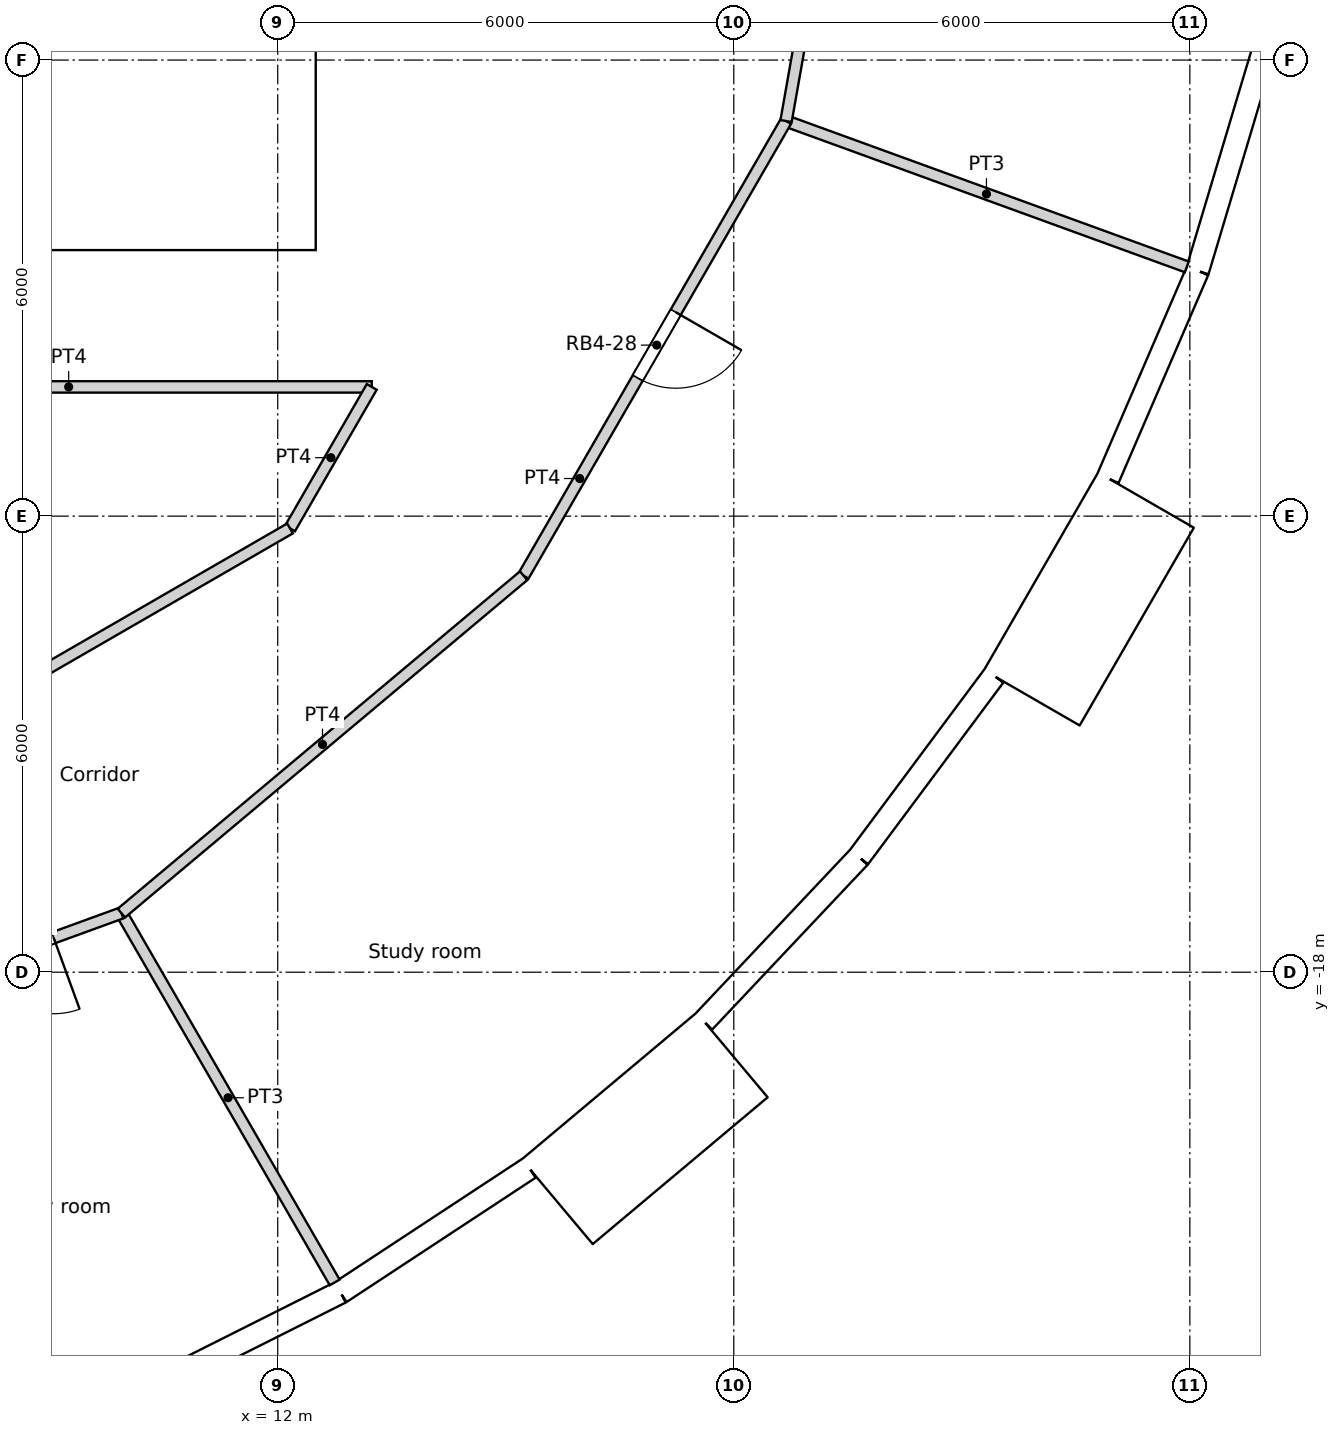
"""IFC4 building model, lengths in metres.
Left out: names, types, materials, properties, quantities, classifications, styles, units other than length and angle.
Written with IfcOpenShell. Run it as: python <this file> out.ifc"""

import sys

from ifc_helpers import new_model, si_unit, direction, frame, frame_2d, origin, origin_2d, place, context, subcontext, project, spatial, rectangle, circle, extrude, element, fill, save


model = new_model("IFC4")
c1 = context("Model", 3, precision=1e-05, world=origin(), true_north=direction((0.0, 1.0)))
c2 = subcontext(c1, "Body", "Model", "MODEL_VIEW")
j1 = project(units=[si_unit("LENGTHUNIT", "METRE"), si_unit("PLANEANGLEUNIT", "RADIAN")], contexts=[c1])
p1 = place(None, origin())
s1 = spatial("IfcSite", under=j1, at=p1, CompositionType="ELEMENT")
p2 = place(p1, origin())
s2 = spatial("IfcBuilding", under=s1, at=p2, CompositionType="ELEMENT")
p3 = place(p2, frame((0.0, 0.0, 158.4)))
s3 = spatial("IfcBuildingStorey", under=s2, at=p3, CompositionType="ELEMENT", Elevation=158.4)
for number, where, z_axis, x_axis in (
    (1, (9.723, -22.54, 0.0), (0.0, 0.0, 1.0), (1.0, 0.0, 0.0)),
    (2, (14.659, -19.69, 0.0), (0.0, 0.0, 1.0), (1.0, 0.0, 0.0)),
    (3, (18.805, -15.779, 0.0), (0.0, 0.0, 1.0), (1.0, 0.0, 0.0)),
    (4, (21.937, -11.017, 0.0), (0.0, 0.0, 1.0), (1.0, 0.0, 0.0)),
    (5, (23.886, -5.661, 0.0), (0.0, 0.0, 1.0), (1.0, 0.0, 0.0)),
):
    element("IfcColumn", number, at=place(p3, frame(where, z_axis=z_axis, x_axis=x_axis)), inside=s3, PredefinedType="COLUMN", context=c2, shape_type="SweptSolid", body=[
        extrude(circle(Radius=0.6, at=origin_2d()), origin(), (0.0, 0.0, 1.0), 3.6),
    ])
for number, where, z_axis, x_axis in (
    (6, (11.735, -14.716, 0.0), (0.0, 0.0, 1.0), (1.0, 0.0, 0.0)),
    (7, (15.552, -10.603, 0.0), (0.0, 0.0, 1.0), (1.0, 0.0, 0.0)),
    (8, (17.986, -5.548, 0.0), (0.0, 0.0, 1.0), (1.0, 0.0, 0.0)),
):
    element("IfcColumn", number, at=place(p3, frame(where, z_axis=z_axis, x_axis=x_axis)), inside=s3, PredefinedType="COLUMN", context=c2, shape_type="SweptSolid", body=[
        extrude(circle(Radius=0.65, at=origin_2d()), origin(), (0.0, 0.0, 1.0), 3.6),
    ])
p4 = place(p3, frame((10.167, -23.546, 0.0), z_axis=(0.0, 0.0, 1.0), x_axis=(0.893637442555, 0.448789618045, 0.0)))
e9 = element("IfcWall", 9, at=p4, inside=s3, PredefinedType="SOLIDWALL", context=c2, shape_type="SweptSolid", body=[
    extrude(rectangle(XDim=2.973, YDim=0.3, at=frame_2d((1.486, 0.0))), origin(), (0.0, 0.0, 1.0), 3.3),
])
p5 = place(p4, frame((1.486, 0.0, 1.55)))
e10 = element("IfcOpeningElement", 10, at=p5, cuts=e9, PredefinedType="OPENING", context=c2, shape_type="SweptSolid", body=[
    extrude(circle(Radius=0.9, at=origin_2d()), frame((0.0, 0.16, 0.0), z_axis=(0.0, -1.0, 0.0), x_axis=(1.0, 0.0, 0.0)), (0.0, 0.0, 1.0), 0.32),
])
p6 = place(p3, frame((12.824, -22.211, 0.0), z_axis=(0.0, 0.0, 1.0), x_axis=(0.835470659512, 0.549535055382, 0.0)))
e11 = element("IfcWall", 11, at=p6, inside=s3, PredefinedType="SOLIDWALL", context=c2, shape_type="SweptSolid", body=[
    extrude(rectangle(XDim=2.973, YDim=0.3, at=frame_2d((1.487, 0.0))), origin(), (0.0, 0.0, 1.0), 3.3),
])
p7 = place(p6, frame((1.486, 0.0, 1.55)))
e12 = element("IfcOpeningElement", 12, at=p7, cuts=e11, PredefinedType="OPENING", context=c2, shape_type="SweptSolid", body=[
    extrude(circle(Radius=0.9, at=origin_2d()), frame((0.0, 0.16, 0.0), z_axis=(0.0, -1.0, 0.0), x_axis=(1.0, 0.0, 0.0)), (0.0, 0.0, 1.0), 0.32),
])
p8 = place(p3, frame((15.678, -21.019, -0.3), z_axis=(0.0, 0.0, 1.0), x_axis=(0.766022196139, 0.642814121673, 0.0)))
e13 = element("IfcWall", 13, at=p8, inside=s3, PredefinedType="ELEMENTEDWALL", context=c2, shape_type="SweptSolid", body=[
    extrude(rectangle(XDim=3.0, YDim=1.45, at=frame_2d((1.5, 0.0))), origin(), (0.0, 0.0, 1.0), 3.6),
])
p9 = place(p8, frame((1.5, 0.0, 1.85)))
e14 = element("IfcOpeningElement", 14, at=p9, cuts=e13, PredefinedType="OPENING", context=c2, shape_type="SweptSolid", body=[
    extrude(circle(Radius=0.9, at=origin_2d()), frame((0.0, 0.735, 0.0), z_axis=(0.0, -1.0, 0.0), x_axis=(1.0, 0.0, 0.0)), (0.0, 0.0, 1.0), 1.47),
])
p10 = place(p3, frame((17.607, -18.648, 0.0), z_axis=(0.0, 0.0, 1.0), x_axis=(0.686235184166, 0.727379730273, 0.0)))
e15 = element("IfcWall", 15, at=p10, inside=s3, PredefinedType="SOLIDWALL", context=c2, shape_type="SweptSolid", body=[
    extrude(rectangle(XDim=2.973, YDim=0.3, at=frame_2d((1.486, 0.0))), origin(), (0.0, 0.0, 1.0), 3.3),
])
p11 = place(p10, frame((1.486, 0.0, 1.55)))
e16 = element("IfcOpeningElement", 16, at=p11, cuts=e15, PredefinedType="OPENING", context=c2, shape_type="SweptSolid", body=[
    extrude(circle(Radius=0.9, at=origin_2d()), frame((0.0, 0.16, 0.0), z_axis=(0.0, -1.0, 0.0), x_axis=(1.0, 0.0, 0.0)), (0.0, 0.0, 1.0), 0.32),
])
p12 = place(p3, frame((19.647, -16.486, 0.0), z_axis=(0.0, 0.0, 1.0), x_axis=(0.597197580538, 0.80209416517, 0.0)))
e17 = element("IfcWall", 17, at=p12, inside=s3, PredefinedType="SOLIDWALL", context=c2, shape_type="SweptSolid", body=[
    extrude(rectangle(XDim=2.973, YDim=0.3, at=frame_2d((1.486, 0.0))), origin(), (0.0, 0.0, 1.0), 3.3),
])
p13 = place(p12, frame((1.486, 0.0, 1.55)))
e18 = element("IfcOpeningElement", 18, at=p13, cuts=e17, PredefinedType="OPENING", context=c2, shape_type="SweptSolid", body=[
    extrude(circle(Radius=0.9, at=origin_2d()), frame((0.0, 0.16, 0.0), z_axis=(0.0, -1.0, 0.0), x_axis=(1.0, 0.0, 0.0)), (0.0, 0.0, 1.0), 0.32),
])
p14 = place(p3, frame((21.922, -14.389, -0.3), z_axis=(0.0, 0.0, 1.0), x_axis=(0.499990139034, 0.866031096941, 0.0)))
e19 = element("IfcWall", 19, at=p14, inside=s3, PredefinedType="ELEMENTEDWALL", context=c2, shape_type="SweptSolid", body=[
    extrude(rectangle(XDim=3.0, YDim=1.45, at=frame_2d((1.5, 0.0))), origin(), (0.0, 0.0, 1.0), 3.6),
])
p15 = place(p14, frame((1.5, 0.0, 1.85)))
e20 = element("IfcOpeningElement", 20, at=p15, cuts=e19, PredefinedType="OPENING", context=c2, shape_type="SweptSolid", body=[
    extrude(circle(Radius=0.9, at=origin_2d()), frame((0.0, 0.735, 0.0), z_axis=(0.0, -1.0, 0.0), x_axis=(1.0, 0.0, 0.0)), (0.0, 0.0, 1.0), 1.47),
])
p16 = place(p3, frame((22.923, -11.502, 0.0), z_axis=(0.0, 0.0, 1.0), x_axis=(0.396148129016, 0.918186614952, 0.0)))
e21 = element("IfcWall", 21, at=p16, inside=s3, PredefinedType="SOLIDWALL", context=c2, shape_type="SweptSolid", body=[
    extrude(rectangle(XDim=2.973, YDim=0.3, at=frame_2d((1.486, 0.0))), origin(), (0.0, 0.0, 1.0), 3.3),
])
p17 = place(p16, frame((1.486, 0.0, 1.55)))
e22 = element("IfcOpeningElement", 22, at=p17, cuts=e21, PredefinedType="OPENING", context=c2, shape_type="SweptSolid", body=[
    extrude(circle(Radius=0.9, at=origin_2d()), frame((0.0, 0.16, 0.0), z_axis=(0.0, -1.0, 0.0), x_axis=(1.0, 0.0, 0.0)), (0.0, 0.0, 1.0), 0.32),
])
p18 = place(p3, frame((24.101, -8.772, 0.0), z_axis=(0.0, 0.0, 1.0), x_axis=(0.286782750849, 0.957995643944, 0.0)))
e23 = element("IfcWall", 23, at=p18, inside=s3, PredefinedType="SOLIDWALL", context=c2, shape_type="SweptSolid", body=[
    extrude(rectangle(XDim=2.973, YDim=0.3, at=frame_2d((1.486, 0.0))), origin(), (0.0, 0.0, 1.0), 3.3),
])
p19 = place(p18, frame((1.486, 0.0, 1.55)))
e24 = element("IfcOpeningElement", 24, at=p19, cuts=e23, PredefinedType="OPENING", context=c2, shape_type="SweptSolid", body=[
    extrude(circle(Radius=0.9, at=origin_2d()), frame((0.0, 0.16, 0.0), z_axis=(0.0, -1.0, 0.0), x_axis=(1.0, 0.0, 0.0)), (0.0, 0.0, 1.0), 0.32),
])
p20 = place(p3, frame((25.521, -6.023, -0.3), z_axis=(0.0, 0.0, 1.0), x_axis=(0.173669267716, 0.984804034035, 0.0)))
e25 = element("IfcWall", 25, at=p20, inside=s3, PredefinedType="ELEMENTEDWALL", context=c2, shape_type="SweptSolid", body=[
    extrude(rectangle(XDim=3.0, YDim=1.45, at=frame_2d((1.5, 0.0))), origin(), (0.0, 0.0, 1.0), 3.6),
])
p21 = place(p20, frame((1.5, 0.0, 1.85)))
e26 = element("IfcOpeningElement", 26, at=p21, cuts=e25, PredefinedType="OPENING", context=c2, shape_type="SweptSolid", body=[
    extrude(circle(Radius=0.9, at=origin_2d()), frame((0.0, 0.735, 0.0), z_axis=(0.0, -1.0, 0.0), x_axis=(1.0, 0.0, 0.0)), (0.0, 0.0, 1.0), 1.47),
])
p22 = place(p3, frame((-12.5, -8.05, 0.0), z_axis=(0.0, 0.0, 1.0), x_axis=(1.0, 0.0, 0.0)))
e27 = element("IfcWall", 27, at=p22, inside=s3, PredefinedType="SOLIDWALL", context=c2, shape_type="SweptSolid", body=[
    extrude(rectangle(XDim=25.0, YDim=0.9, at=frame_2d((12.5, 0.0))), origin(), (0.0, 0.0, 1.0), 3.6),
])
p23 = place(p22, frame((13.4, 0.0, 0.0)))
e28 = element("IfcOpeningElement", 28, at=p23, cuts=e27, PredefinedType="OPENING", context=c2, shape_type="SweptSolid", body=[
    extrude(rectangle(XDim=1.0, YDim=2.1, at=frame_2d((0.5, 1.05))), frame((0.0, 0.45, 0.0), z_axis=(0.0, -1.0, 0.0), x_axis=(1.0, 0.0, 0.0)), (0.0, 0.0, 1.0), 0.9),
])
p24 = place(p22, frame((8.3, 0.0, 0.0)))
e29 = element("IfcOpeningElement", 29, at=p24, cuts=e27, PredefinedType="OPENING", context=c2, shape_type="SweptSolid", body=[
    extrude(rectangle(XDim=1.8, YDim=2.1, at=frame_2d((0.9, 1.05))), frame((0.0, 0.45, 0.0), z_axis=(0.0, -1.0, 0.0), x_axis=(1.0, 0.0, 0.0)), (0.0, 0.0, 1.0), 0.9),
])
p25 = place(p22, frame((14.9, 0.0, 0.0)))
e30 = element("IfcOpeningElement", 30, at=p25, cuts=e27, PredefinedType="OPENING", context=c2, shape_type="SweptSolid", body=[
    extrude(rectangle(XDim=1.8, YDim=2.1, at=frame_2d((0.9, 1.05))), frame((0.0, 0.45, 0.0), z_axis=(0.0, -1.0, 0.0), x_axis=(1.0, 0.0, 0.0)), (0.0, 0.0, 1.0), 0.9),
])
p26 = place(p3, frame((12.05, -7.6, 0.0), z_axis=(0.0, 0.0, 1.0), x_axis=(0.0, 1.0, 0.0)))
e31 = element("IfcWall", 31, at=p26, inside=s3, PredefinedType="SOLIDWALL", context=c2, shape_type="SweptSolid", body=[
    extrude(rectangle(XDim=15.2, YDim=0.9, at=frame_2d((7.6, 0.0))), origin(), (0.0, 0.0, 1.0), 3.6),
])
p27 = place(p26, frame((5.1, 0.0, 0.0)))
e32 = element("IfcOpeningElement", 32, at=p27, cuts=e31, PredefinedType="OPENING", context=c2, shape_type="SweptSolid", body=[
    extrude(rectangle(XDim=1.0, YDim=2.1, at=frame_2d((0.5, 1.05))), frame((0.0, 0.45, 0.0), z_axis=(0.0, -1.0, 0.0), x_axis=(1.0, 0.0, 0.0)), (0.0, 0.0, 1.0), 0.9),
])
p28 = place(p3, frame((9.05, -7.0, 0.0), z_axis=(0.0, 0.0, 1.0), x_axis=(0.0, 1.0, 0.0)))
e33 = element("IfcWall", 33, at=p28, inside=s3, PredefinedType="SOLIDWALL", context=c2, shape_type="SweptSolid", body=[
    extrude(rectangle(XDim=14.0, YDim=0.3, at=frame_2d((7.0, 0.0))), origin(), (0.0, 0.0, 1.0), 3.3),
])
p29 = place(p28, frame((7.0, 0.0, 0.0)))
e34 = element("IfcOpeningElement", 34, at=p29, cuts=e33, PredefinedType="OPENING", context=c2, shape_type="SweptSolid", body=[
    extrude(rectangle(XDim=1.8, YDim=2.1, at=frame_2d((0.9, 1.05))), frame((0.0, 0.15, 0.0), z_axis=(0.0, -1.0, 0.0), x_axis=(1.0, 0.0, 0.0)), (0.0, 0.0, 1.0), 0.3),
])
p30 = place(p3, frame((4.2, -7.15, 0.0), z_axis=(0.0, 0.0, 1.0), x_axis=(1.0, 0.0, 0.0)))
e35 = element("IfcWall", 35, at=p30, inside=s3, PredefinedType="SOLIDWALL", context=c2, shape_type="SweptSolid", body=[
    extrude(rectangle(XDim=4.85, YDim=0.9, at=frame_2d((2.425, 0.0))), origin(), (0.0, 0.0, 1.0), 3.3),
])
p31 = place(p3, frame((-3.025, -10.3, 0.0), z_axis=(0.0, 0.0, 1.0), x_axis=(1.0, 0.0, 0.0)))
e36 = element("IfcWall", 36, at=p31, inside=s3, PredefinedType="PARTITIONING", context=c2, shape_type="SweptSolid", body=[
    extrude(rectangle(XDim=16.262, YDim=0.15, at=frame_2d((8.131, 0.0))), origin(), (0.0, 0.0, 1.0), 3.3),
])
p32 = place(p31, frame((7.287, 0.0, 0.0)))
e37 = element("IfcOpeningElement", 37, at=p32, cuts=e36, PredefinedType="OPENING", context=c2, shape_type="SweptSolid", body=[
    extrude(rectangle(XDim=0.95, YDim=2.1, at=frame_2d((0.475, 1.05))), frame((0.0, 0.075, 0.0), z_axis=(0.0, -1.0, 0.0), x_axis=(1.0, 0.0, 0.0)), (0.0, 0.0, 1.0), 0.15),
])
p33 = place(p3, frame((12.162, -12.162, 0.0), z_axis=(0.0, 0.0, 1.0), x_axis=(0.499961633463, 0.866047553582, 0.0)))
e38 = element("IfcWall", 38, at=p33, inside=s3, PredefinedType="PARTITIONING", context=c2, shape_type="SweptSolid", body=[
    extrude(rectangle(XDim=2.15, YDim=0.15, at=frame_2d((1.075, 0.0))), origin(), (0.0, 0.0, 1.0), 3.3),
])
p34 = place(p3, frame((15.235, -12.784, 0.0), z_axis=(0.0, 0.0, 1.0), x_axis=(0.499914202267, 0.866074933462, 0.0)))
e39 = element("IfcWall", 39, at=p34, inside=s3, PredefinedType="PARTITIONING", context=c2, shape_type="SweptSolid", body=[
    extrude(rectangle(XDim=6.907, YDim=0.15, at=frame_2d((3.454, 0.0))), origin(), (0.0, 0.0, 1.0), 3.3),
])
p35 = place(p34, frame((3.003, 0.0, 0.0)))
e40 = element("IfcOpeningElement", 40, at=p35, cuts=e39, PredefinedType="OPENING", context=c2, shape_type="SweptSolid", body=[
    extrude(rectangle(XDim=1.0, YDim=2.04, at=frame_2d((0.5, 1.02))), frame((0.0, 0.075, 0.0), z_axis=(0.0, -1.0, 0.0), x_axis=(1.0, 0.0, 0.0)), (0.0, 0.0, 1.0), 0.15),
])
p36 = place(p3, frame((9.943, -17.222, 0.0), z_axis=(0.0, 0.0, 1.0), x_axis=(0.766192104565, 0.642611592567, 0.0)))
e41 = element("IfcWall", 41, at=p36, inside=s3, PredefinedType="PARTITIONING", context=c2, shape_type="SweptSolid", body=[
    extrude(rectangle(XDim=6.906, YDim=0.15, at=frame_2d((3.453, 0.0))), origin(), (0.0, 0.0, 1.0), 3.3),
])
p37 = place(p3, frame((18.688, -6.802, 0.0), z_axis=(0.0, 0.0, 1.0), x_axis=(0.173728873845, 0.98479352069, 0.0)))
e42 = element("IfcWall", 42, at=p37, inside=s3, PredefinedType="PARTITIONING", context=c2, shape_type="SweptSolid", body=[
    extrude(rectangle(XDim=6.907, YDim=0.15, at=frame_2d((3.454, 0.0))), origin(), (0.0, 0.0, 1.0), 3.3),
])
p38 = place(p37, frame((2.953, 0.0, 0.0)))
e43 = element("IfcOpeningElement", 43, at=p38, cuts=e42, PredefinedType="OPENING", context=c2, shape_type="SweptSolid", body=[
    extrude(rectangle(XDim=1.0, YDim=2.04, at=frame_2d((0.5, 1.02))), frame((0.0, 0.075, 0.0), z_axis=(0.0, -1.0, 0.0), x_axis=(1.0, 0.0, 0.0)), (0.0, 0.0, 1.0), 0.15),
])
p39 = place(p3, frame((4.452, -16.614, 0.0), z_axis=(0.0, 0.0, 1.0), x_axis=(0.866005203721, 0.500034985904, 0.0)))
e44 = element("IfcWall", 44, at=p39, inside=s3, PredefinedType="PARTITIONING", context=c2, shape_type="SweptSolid", body=[
    extrude(rectangle(XDim=8.903, YDim=0.15, at=frame_2d((4.452, 0.0))), origin(), (0.0, 0.0, 1.0), 3.3),
])
p40 = place(p3, frame((3.453, -19.586, 0.0), z_axis=(0.0, 0.0, 1.0), x_axis=(0.939607544688, 0.342253797591, 0.0)))
e45 = element("IfcWall", 45, at=p40, inside=s3, PredefinedType="PARTITIONING", context=c2, shape_type="SweptSolid", body=[
    extrude(rectangle(XDim=6.908, YDim=0.15, at=frame_2d((3.454, 0.0))), origin(), (0.0, 0.0, 1.0), 3.3),
])
p41 = place(p40, frame((4.959, 0.0, 0.0)))
e46 = element("IfcOpeningElement", 46, at=p41, cuts=e45, PredefinedType="OPENING", context=c2, shape_type="SweptSolid", body=[
    extrude(rectangle(XDim=1.0, YDim=2.04, at=frame_2d((0.5, 1.02))), frame((0.0, 0.075, 0.0), z_axis=(0.0, -1.0, 0.0), x_axis=(1.0, 0.0, 0.0)), (0.0, 0.0, 1.0), 0.15),
])
p42 = place(p3, frame((9.944, -17.223, 0.0), z_axis=(0.0, 0.0, 1.0), x_axis=(0.500010020406, -0.866019618423, 0.0)))
e47 = element("IfcWall", 47, at=p42, inside=s3, PredefinedType="PARTITIONING", context=c2, shape_type="SweptSolid", body=[
    extrude(rectangle(XDim=5.61, YDim=0.15, at=frame_2d((2.805, 0.0))), origin(), (0.0, 0.0, 1.0), 3.3),
])
p43 = place(p3, frame((18.688, -6.802, 0.0), z_axis=(0.0, 0.0, 1.0), x_axis=(0.939686652043, -0.342036541866, 0.0)))
e48 = element("IfcWall", 48, at=p43, inside=s3, PredefinedType="PARTITIONING", context=c2, shape_type="SweptSolid", body=[
    extrude(rectangle(XDim=5.61, YDim=0.15, at=frame_2d((2.805, 0.0))), origin(), (0.0, 0.0, 1.0), 3.3),
])
p44 = place(p5, origin())
e49 = element("IfcWindow", 49, at=p44, inside=s3, PartitioningType="SINGLE_PANEL", PredefinedType="WINDOW", context=c2, shape_type="SweptSolid", body=[
    extrude(circle(Radius=0.9, at=origin_2d()), frame((0.0, 0.12, 0.0), z_axis=(0.0, -1.0, 0.0), x_axis=(1.0, 0.0, 0.0)), (0.0, 0.0, 1.0), 0.1),
])
fill(e10, e49)
p45 = place(p7, origin())
e50 = element("IfcWindow", 50, at=p45, inside=s3, PartitioningType="SINGLE_PANEL", PredefinedType="WINDOW", context=c2, shape_type="SweptSolid", body=[
    extrude(circle(Radius=0.9, at=origin_2d()), frame((0.0, 0.12, 0.0), z_axis=(0.0, -1.0, 0.0), x_axis=(1.0, 0.0, 0.0)), (0.0, 0.0, 1.0), 0.1),
])
fill(e12, e50)
p46 = place(p9, origin())
e51 = element("IfcWindow", 51, at=p46, inside=s3, PartitioningType="SINGLE_PANEL", PredefinedType="WINDOW", context=c2, shape_type="SweptSolid", body=[
    extrude(circle(Radius=0.9, at=origin_2d()), frame((0.0, 0.695, 0.0), z_axis=(0.0, -1.0, 0.0), x_axis=(1.0, 0.0, 0.0)), (0.0, 0.0, 1.0), 0.1),
])
fill(e14, e51)
p47 = place(p11, origin())
e52 = element("IfcWindow", 52, at=p47, inside=s3, PartitioningType="SINGLE_PANEL", PredefinedType="WINDOW", context=c2, shape_type="SweptSolid", body=[
    extrude(circle(Radius=0.9, at=origin_2d()), frame((0.0, 0.12, 0.0), z_axis=(0.0, -1.0, 0.0), x_axis=(1.0, 0.0, 0.0)), (0.0, 0.0, 1.0), 0.1),
])
fill(e16, e52)
p48 = place(p13, origin())
e53 = element("IfcWindow", 53, at=p48, inside=s3, PartitioningType="SINGLE_PANEL", PredefinedType="WINDOW", context=c2, shape_type="SweptSolid", body=[
    extrude(circle(Radius=0.9, at=origin_2d()), frame((0.0, 0.12, 0.0), z_axis=(0.0, -1.0, 0.0), x_axis=(1.0, 0.0, 0.0)), (0.0, 0.0, 1.0), 0.1),
])
fill(e18, e53)
p49 = place(p15, origin())
e54 = element("IfcWindow", 54, at=p49, inside=s3, PartitioningType="SINGLE_PANEL", PredefinedType="WINDOW", context=c2, shape_type="SweptSolid", body=[
    extrude(circle(Radius=0.9, at=origin_2d()), frame((0.0, 0.695, 0.0), z_axis=(0.0, -1.0, 0.0), x_axis=(1.0, 0.0, 0.0)), (0.0, 0.0, 1.0), 0.1),
])
fill(e20, e54)
p50 = place(p17, origin())
e55 = element("IfcWindow", 55, at=p50, inside=s3, PartitioningType="SINGLE_PANEL", PredefinedType="WINDOW", context=c2, shape_type="SweptSolid", body=[
    extrude(circle(Radius=0.9, at=origin_2d()), frame((0.0, 0.12, 0.0), z_axis=(0.0, -1.0, 0.0), x_axis=(1.0, 0.0, 0.0)), (0.0, 0.0, 1.0), 0.1),
])
fill(e22, e55)
p51 = place(p19, origin())
e56 = element("IfcWindow", 56, at=p51, inside=s3, PartitioningType="SINGLE_PANEL", PredefinedType="WINDOW", context=c2, shape_type="SweptSolid", body=[
    extrude(circle(Radius=0.9, at=origin_2d()), frame((0.0, 0.12, 0.0), z_axis=(0.0, -1.0, 0.0), x_axis=(1.0, 0.0, 0.0)), (0.0, 0.0, 1.0), 0.1),
])
fill(e24, e56)
p52 = place(p41, origin())
e57 = element("IfcDoor", 57, at=p52, inside=s3, OperationType="SINGLE_SWING_LEFT", PredefinedType="DOOR", context=c2, shape_type="SweptSolid", body=[
    extrude(rectangle(XDim=1.0, YDim=2.04, at=frame_2d((0.5, 1.02))), frame((0.0, 0.025, 0.0), z_axis=(0.0, -1.0, 0.0), x_axis=(1.0, 0.0, 0.0)), (0.0, 0.0, 1.0), 0.05),
])
fill(e46, e57)
p53 = place(p35, origin())
e58 = element("IfcDoor", 58, at=p53, inside=s3, OperationType="SINGLE_SWING_LEFT", PredefinedType="DOOR", context=c2, shape_type="SweptSolid", body=[
    extrude(rectangle(XDim=1.0, YDim=2.04, at=frame_2d((0.5, 1.02))), frame((0.0, 0.025, 0.0), z_axis=(0.0, -1.0, 0.0), x_axis=(1.0, 0.0, 0.0)), (0.0, 0.0, 1.0), 0.05),
])
fill(e40, e58)
save(model, sys.argv[1])
